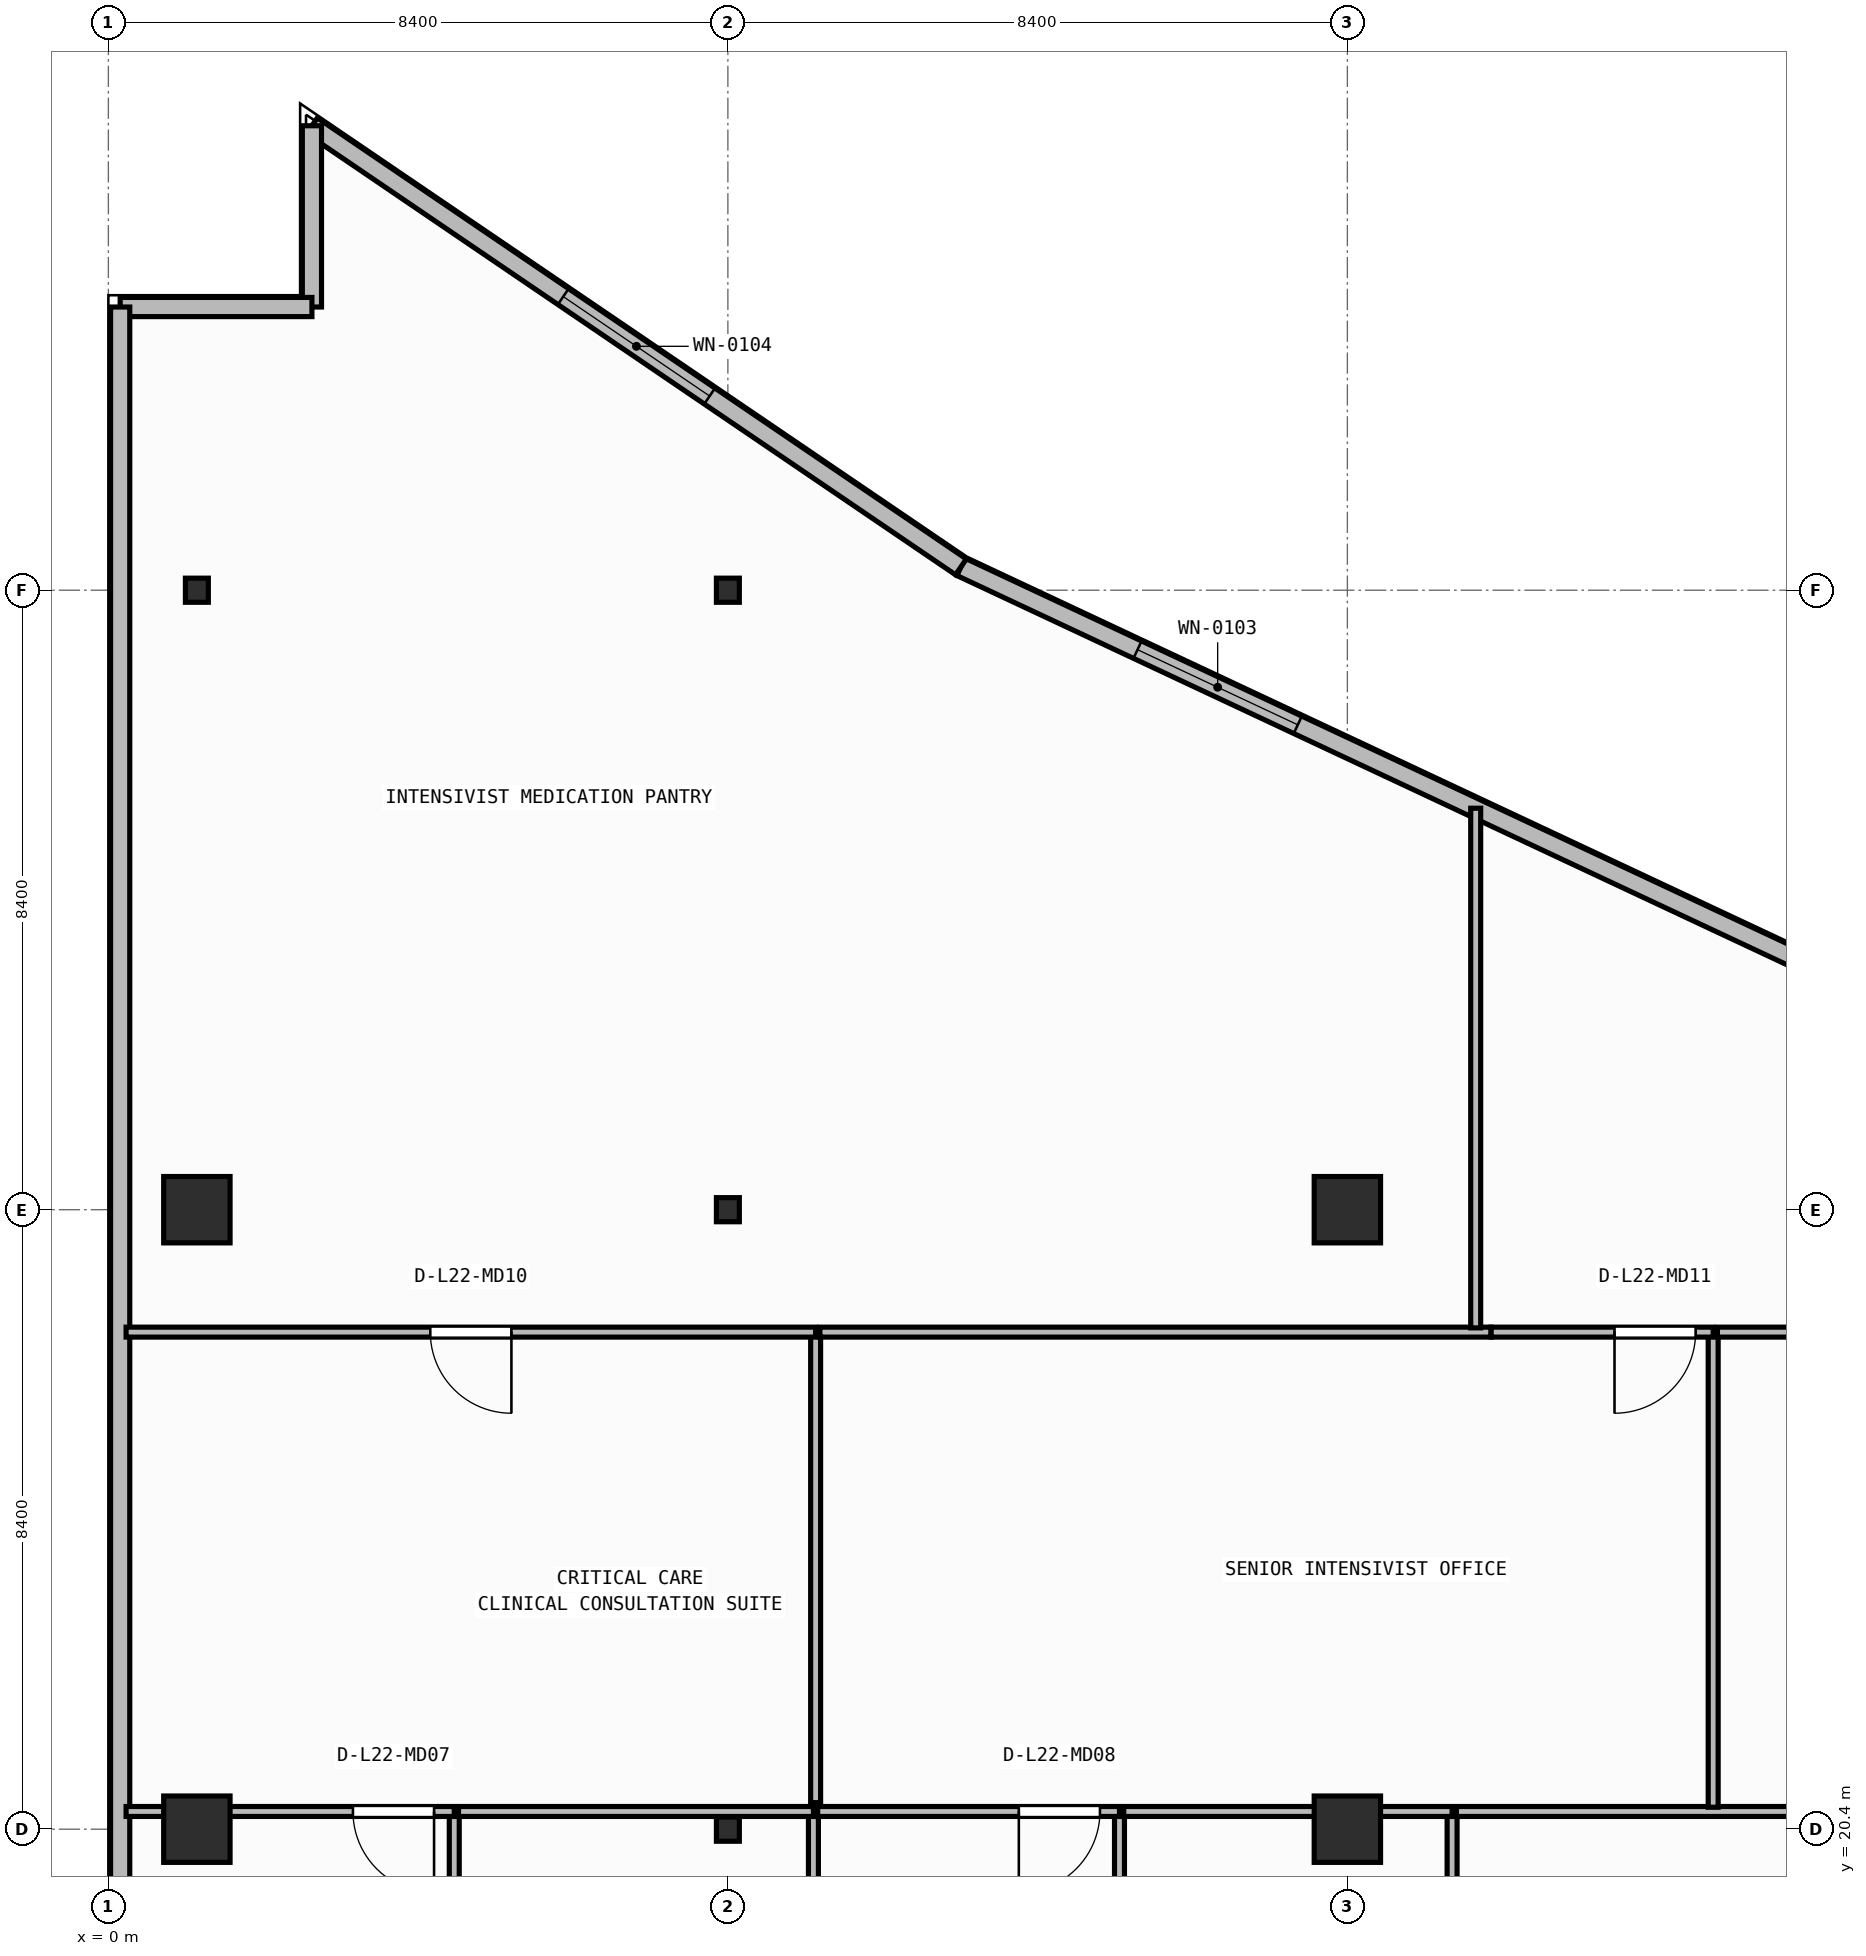
"""IFC4 building model, lengths in metres.
Left out: names, types, materials, properties, quantities, classifications, styles, units other than length and angle.
Written with IfcOpenShell. Run it as: python <this file> out.ifc"""

import sys

from ifc_helpers import new_model, si_unit, direction, frame, frame_2d, origin, origin_2d, place, context, subcontext, project, spatial, rectangle, i_section, extrude, element, fill, save


model = new_model("IFC4")
c1 = context("Model", 3, precision=1e-05, world=origin(), true_north=direction((0.0, 1.0)))
c2 = subcontext(c1, "Body", "Model", "MODEL_VIEW")
j1 = project(units=[si_unit("LENGTHUNIT", "METRE"), si_unit("PLANEANGLEUNIT", "RADIAN")], contexts=[c1])
p1 = place(None, origin())
s1 = spatial("IfcSite", under=j1, at=p1, CompositionType="ELEMENT")
p2 = place(p1, origin())
s2 = spatial("IfcBuilding", under=s1, at=p2, CompositionType="ELEMENT")
p3 = place(p2, frame((0.0, 0.0, 89.65)))
s3 = spatial("IfcBuildingStorey", under=s2, at=p3, CompositionType="ELEMENT", Elevation=89.65)
p4 = place(p3, frame((1.2, 20.4, 0.0), z_axis=(0.0, 0.0, 1.0), x_axis=(1.0, 0.0, 0.0)))
e1 = element("IfcColumn", 1, at=p4, inside=s3, PredefinedType="COLUMN", context=c2, shape_type="SweptSolid", body=[
    extrude(rectangle(XDim=0.9, YDim=0.9, at=origin_2d()), origin(), (0.0, 0.0, 1.0), 3.95),
])
p5 = place(p3, frame((8.4, 20.4, 0.0), z_axis=(0.0, 0.0, 1.0), x_axis=(1.0, 0.0, 0.0)))
e2 = element("IfcColumn", 2, at=p5, inside=s3, PredefinedType="COLUMN", context=c2, shape_type="SweptSolid", body=[
    extrude(i_section(OverallWidth=0.311, OverallDepth=0.327, WebThickness=0.016, FlangeThickness=0.025, FilletRadius=0.017, at=origin_2d()), origin(), (0.0, 0.0, 1.0), 3.95),
])
for number, where, z_axis, x_axis in (
    (3, (16.8, 20.4, 0.0), (0.0, 0.0, 1.0), (1.0, 0.0, 0.0)),
    (4, (1.2, 28.8, 0.0), (0.0, 0.0, 1.0), (1.0, 0.0, 0.0)),
):
    element("IfcColumn", number, at=place(p3, frame(where, z_axis=z_axis, x_axis=x_axis)), inside=s3, PredefinedType="COLUMN", context=c2, shape_type="SweptSolid", body=[
        extrude(rectangle(XDim=0.9, YDim=0.9, at=origin_2d()), origin(), (0.0, 0.0, 1.0), 3.95),
    ])
p6 = place(p3, frame((8.4, 28.8, 0.0), z_axis=(0.0, 0.0, 1.0), x_axis=(1.0, 0.0, 0.0)))
e5 = element("IfcColumn", 5, at=p6, inside=s3, PredefinedType="COLUMN", context=c2, shape_type="SweptSolid", body=[
    extrude(i_section(OverallWidth=0.311, OverallDepth=0.327, WebThickness=0.016, FlangeThickness=0.025, FilletRadius=0.017, at=origin_2d()), origin(), (0.0, 0.0, 1.0), 3.95),
])
p7 = place(p3, frame((16.8, 28.8, 0.0), z_axis=(0.0, 0.0, 1.0), x_axis=(1.0, 0.0, 0.0)))
e6 = element("IfcColumn", 6, at=p7, inside=s3, PredefinedType="COLUMN", context=c2, shape_type="SweptSolid", body=[
    extrude(rectangle(XDim=0.9, YDim=0.9, at=origin_2d()), origin(), (0.0, 0.0, 1.0), 3.95),
])
for number, where, z_axis, x_axis in (
    (7, (1.2, 37.2, 0.0), (0.0, 0.0, 1.0), (1.0, 0.0, 0.0)),
    (8, (8.4, 37.2, 0.0), (0.0, 0.0, 1.0), (1.0, 0.0, 0.0)),
):
    element("IfcColumn", number, at=place(p3, frame(where, z_axis=z_axis, x_axis=x_axis)), inside=s3, PredefinedType="COLUMN", context=c2, shape_type="SweptSolid", body=[
        extrude(i_section(OverallWidth=0.311, OverallDepth=0.327, WebThickness=0.016, FlangeThickness=0.025, FilletRadius=0.017, at=origin_2d()), origin(), (0.0, 0.0, 1.0), 3.95),
    ])
p8 = place(p3, frame((24.408, 31.492, 0.0), z_axis=(0.0, 0.0, 1.0), x_axis=(-0.905396522918, 0.424566998585, 0.0)))
e9 = element("IfcWall", 9, at=p8, inside=s3, PredefinedType="STANDARD", context=c2, shape_type="SweptSolid", body=[
    extrude(rectangle(XDim=14.189, YDim=0.26, at=frame_2d((7.095, 0.0))), origin(), (0.0, 0.0, 1.0), 3.71),
])
p9 = place(p8, frame((9.145, 0.0, 0.9)))
e10 = element("IfcOpeningElement", 10, at=p9, cuts=e9, PredefinedType="OPENING", context=c2, shape_type="SweptSolid", body=[
    extrude(rectangle(XDim=2.4, YDim=1.65, at=frame_2d((1.2, 0.825))), frame((0.0, 0.14, 0.0), z_axis=(0.0, -1.0, 0.0), x_axis=(1.0, 0.0, 0.0)), (0.0, 0.0, 1.0), 0.28),
])
p10 = place(p3, frame((11.561, 37.517, 0.0), z_axis=(0.0, 0.0, 1.0), x_axis=(-0.827064743936, 0.562106670782, 0.0)))
e11 = element("IfcWall", 11, at=p10, inside=s3, PredefinedType="STANDARD", context=c2, shape_type="SweptSolid", body=[
    extrude(rectangle(XDim=10.641, YDim=0.26, at=frame_2d((5.32, 0.0))), origin(), (0.0, 0.0, 1.0), 3.71),
])
p11 = place(p10, frame((4.12, 0.0, 0.9)))
e12 = element("IfcOpeningElement", 12, at=p11, cuts=e11, PredefinedType="OPENING", context=c2, shape_type="SweptSolid", body=[
    extrude(rectangle(XDim=2.4, YDim=1.65, at=frame_2d((1.2, 0.825))), frame((0.0, 0.14, 0.0), z_axis=(0.0, -1.0, 0.0), x_axis=(1.0, 0.0, 0.0)), (0.0, 0.0, 1.0), 0.28),
])
p12 = place(p3, frame((2.76, 43.498, 0.0), z_axis=(0.0, 0.0, 1.0), x_axis=(0.0, -1.0, 0.0)))
e13 = element("IfcWall", 13, at=p12, inside=s3, PredefinedType="STANDARD", context=c2, shape_type="SweptSolid", body=[
    extrude(rectangle(XDim=2.458, YDim=0.26, at=frame_2d((1.229, 0.0))), origin(), (0.0, 0.0, 1.0), 3.71),
])
p13 = place(p3, frame((2.76, 41.04, 0.0), z_axis=(0.0, 0.0, 1.0), x_axis=(-1.0, 0.0, 0.0)))
e14 = element("IfcWall", 14, at=p13, inside=s3, PredefinedType="STANDARD", context=c2, shape_type="SweptSolid", body=[
    extrude(rectangle(XDim=2.6, YDim=0.26, at=frame_2d((1.3, 0.0))), origin(), (0.0, 0.0, 1.0), 3.71),
])
p14 = place(p3, frame((0.16, 41.04, 0.0), z_axis=(0.0, 0.0, 1.0), x_axis=(0.0, -1.0, 0.0)))
e15 = element("IfcWall", 15, at=p14, inside=s3, PredefinedType="STANDARD", context=c2, shape_type="SweptSolid", body=[
    extrude(rectangle(XDim=38.28, YDim=0.26, at=frame_2d((19.14, 0.0))), origin(), (0.0, 0.0, 1.0), 3.71),
])
p15 = place(p14, frame((28.15, 0.0, 0.9)))
e16 = element("IfcOpeningElement", 16, at=p15, cuts=e15, PredefinedType="OPENING", context=c2, shape_type="SweptSolid", body=[
    extrude(rectangle(XDim=2.4, YDim=1.65, at=frame_2d((1.2, 0.825))), frame((0.0, 0.14, 0.0), z_axis=(0.0, -1.0, 0.0), x_axis=(1.0, 0.0, 0.0)), (0.0, 0.0, 1.0), 0.28),
])
p16 = place(p3, frame((4.69, 18.04, 0.0), z_axis=(0.0, 0.0, 1.0), x_axis=(0.0, 1.0, 0.0)))
e17 = element("IfcWall", 17, at=p16, inside=s3, PredefinedType="PARTITIONING", context=c2, shape_type="SweptSolid", body=[
    extrude(rectangle(XDim=2.6, YDim=0.135, at=frame_2d((1.3, 0.0))), origin(), (0.0, 0.0, 1.0), 3.71),
])
p17 = place(p3, frame((4.69, 20.64, 0.0), z_axis=(0.0, 0.0, 1.0), x_axis=(-1.0, 0.0, 0.0)))
e18 = element("IfcWall", 18, at=p17, inside=s3, PredefinedType="PARTITIONING", context=c2, shape_type="SweptSolid", body=[
    extrude(rectangle(XDim=4.45, YDim=0.135, at=frame_2d((2.225, 0.0))), origin(), (0.0, 0.0, 1.0), 3.073),
])
p18 = place(p17, frame((0.274, 0.0, 0.0)))
e19 = element("IfcOpeningElement", 19, at=p18, cuts=e18, PredefinedType="OPENING", context=c2, shape_type="SweptSolid", body=[
    extrude(rectangle(XDim=1.1, YDim=2.1, at=frame_2d((0.55, 1.05))), frame((0.0, 0.077, 0.0), z_axis=(0.0, -1.0, 0.0), x_axis=(1.0, 0.0, 0.0)), (0.0, 0.0, 1.0), 0.155),
])
p19 = place(p3, frame((9.56, 17.833, 0.0), z_axis=(0.0, 0.0, 1.0), x_axis=(0.0, 1.0, 0.0)))
e20 = element("IfcWall", 20, at=p19, inside=s3, PredefinedType="PARTITIONING", context=c2, shape_type="SweptSolid", body=[
    extrude(rectangle(XDim=2.807, YDim=0.135, at=frame_2d((1.404, 0.0))), origin(), (0.0, 0.0, 1.0), 3.71),
])
p20 = place(p3, frame((9.56, 20.64, 0.0), z_axis=(0.0, 0.0, 1.0), x_axis=(-1.0, 0.0, 0.0)))
e21 = element("IfcWall", 21, at=p20, inside=s3, PredefinedType="PARTITIONING", context=c2, shape_type="SweptSolid", body=[
    extrude(rectangle(XDim=4.812, YDim=0.135, at=frame_2d((2.406, 0.0))), origin(), (0.0, 0.0, 1.0), 3.073),
])
p21 = place(p3, frame((13.71, 14.76, 0.0), z_axis=(0.0, 0.0, 1.0), x_axis=(0.0, 1.0, 0.0)))
e22 = element("IfcWall", 22, at=p21, inside=s3, PredefinedType="PARTITIONING", context=c2, shape_type="SweptSolid", body=[
    extrude(rectangle(XDim=5.88, YDim=0.135, at=frame_2d((2.94, 0.0))), origin(), (0.0, 0.0, 1.0), 3.71),
])
p22 = place(p3, frame((13.71, 20.64, 0.0), z_axis=(0.0, 0.0, 1.0), x_axis=(-1.0, 0.0, 0.0)))
e23 = element("IfcWall", 23, at=p22, inside=s3, PredefinedType="PARTITIONING", context=c2, shape_type="SweptSolid", body=[
    extrude(rectangle(XDim=4.093, YDim=0.135, at=frame_2d((2.046, 0.0))), origin(), (0.0, 0.0, 1.0), 3.073),
])
p23 = place(p22, frame((0.265, 0.0, 0.0)))
e24 = element("IfcOpeningElement", 24, at=p23, cuts=e23, PredefinedType="OPENING", context=c2, shape_type="SweptSolid", body=[
    extrude(rectangle(XDim=1.1, YDim=2.1, at=frame_2d((0.55, 1.05))), frame((0.0, 0.077, 0.0), z_axis=(0.0, -1.0, 0.0), x_axis=(1.0, 0.0, 0.0)), (0.0, 0.0, 1.0), 0.155),
])
p24 = place(p3, frame((18.22, 17.833, 0.0), z_axis=(0.0, 0.0, 1.0), x_axis=(0.0, 1.0, 0.0)))
e25 = element("IfcWall", 25, at=p24, inside=s3, PredefinedType="PARTITIONING", context=c2, shape_type="SweptSolid", body=[
    extrude(rectangle(XDim=2.807, YDim=0.135, at=frame_2d((1.404, 0.0))), origin(), (0.0, 0.0, 1.0), 3.71),
])
p25 = place(p3, frame((18.22, 20.64, 0.0), z_axis=(0.0, 0.0, 1.0), x_axis=(-1.0, 0.0, 0.0)))
e26 = element("IfcWall", 26, at=p25, inside=s3, PredefinedType="PARTITIONING", context=c2, shape_type="SweptSolid", body=[
    extrude(rectangle(XDim=4.452, YDim=0.135, at=frame_2d((2.226, 0.0))), origin(), (0.0, 0.0, 1.0), 3.073),
])
p26 = place(p3, frame((23.032, 20.64, 0.0), z_axis=(0.0, 0.0, 1.0), x_axis=(-1.0, 0.0, 0.0)))
e27 = element("IfcWall", 27, at=p26, inside=s3, PredefinedType="PARTITIONING", context=c2, shape_type="SweptSolid", body=[
    extrude(rectangle(XDim=4.755, YDim=0.135, at=frame_2d((2.377, 0.0))), origin(), (0.0, 0.0, 1.0), 3.073),
])
p27 = place(p3, frame((9.59, 20.76, 0.0), z_axis=(0.0, 0.0, 1.0), x_axis=(0.0, 1.0, 0.0)))
e28 = element("IfcWall", 28, at=p27, inside=s3, PredefinedType="PARTITIONING", context=c2, shape_type="SweptSolid", body=[
    extrude(rectangle(XDim=6.38, YDim=0.135, at=frame_2d((3.19, 0.0))), origin(), (0.0, 0.0, 1.0), 3.71),
])
p28 = place(p3, frame((9.59, 27.14, 0.0), z_axis=(0.0, 0.0, 1.0), x_axis=(-1.0, 0.0, 0.0)))
e29 = element("IfcWall", 29, at=p28, inside=s3, PredefinedType="PARTITIONING", context=c2, shape_type="SweptSolid", body=[
    extrude(rectangle(XDim=9.35, YDim=0.135, at=frame_2d((4.675, 0.0))), origin(), (0.0, 0.0, 1.0), 3.71),
])
p29 = place(p28, frame((4.125, 0.0, 0.0)))
e30 = element("IfcOpeningElement", 30, at=p29, cuts=e29, PredefinedType="OPENING", context=c2, shape_type="SweptSolid", body=[
    extrude(rectangle(XDim=1.1, YDim=2.1, at=frame_2d((0.55, 1.05))), frame((0.0, 0.077, 0.0), z_axis=(0.0, -1.0, 0.0), x_axis=(1.0, 0.0, 0.0)), (0.0, 0.0, 1.0), 0.155),
])
p30 = place(p3, frame((21.76, 20.698, 0.0), z_axis=(0.0, 0.0, 1.0), x_axis=(0.0, 1.0, 0.0)))
e31 = element("IfcWall", 31, at=p30, inside=s3, PredefinedType="PARTITIONING", context=c2, shape_type="SweptSolid", body=[
    extrude(rectangle(XDim=6.442, YDim=0.135, at=frame_2d((3.221, 0.0))), origin(), (0.0, 0.0, 1.0), 3.71),
])
p31 = place(p3, frame((18.748, 27.14, 0.0), z_axis=(0.0, 0.0, 1.0), x_axis=(-1.0, 0.0, 0.0)))
e32 = element("IfcWall", 32, at=p31, inside=s3, PredefinedType="PARTITIONING", context=c2, shape_type="SweptSolid", body=[
    extrude(rectangle(XDim=9.1, YDim=0.135, at=frame_2d((4.55, 0.0))), origin(), (0.0, 0.0, 1.0), 3.71),
])
p32 = place(p3, frame((21.76, 27.14, 0.0), z_axis=(0.0, 0.0, 1.0), x_axis=(-1.0, 0.0, 0.0)))
e33 = element("IfcWall", 33, at=p32, inside=s3, PredefinedType="PARTITIONING", context=c2, shape_type="SweptSolid", body=[
    extrude(rectangle(XDim=3.01, YDim=0.135, at=frame_2d((1.505, 0.0))), origin(), (0.0, 0.0, 1.0), 3.71),
])
p33 = place(p32, frame((0.238, 0.0, 0.0)))
e34 = element("IfcOpeningElement", 34, at=p33, cuts=e33, PredefinedType="OPENING", context=c2, shape_type="SweptSolid", body=[
    extrude(rectangle(XDim=1.1, YDim=2.1, at=frame_2d((0.55, 1.05))), frame((0.0, 0.077, 0.0), z_axis=(0.0, -1.0, 0.0), x_axis=(1.0, 0.0, 0.0)), (0.0, 0.0, 1.0), 0.155),
])
p34 = place(p3, frame((38.45, 27.14, 0.0), z_axis=(0.0, 0.0, 1.0), x_axis=(-1.0, 0.0, 0.0)))
e35 = element("IfcWall", 35, at=p34, inside=s3, PredefinedType="PARTITIONING", context=c2, shape_type="SweptSolid", body=[
    extrude(rectangle(XDim=16.633, YDim=0.135, at=frame_2d((8.316, 0.0))), origin(), (0.0, 0.0, 1.0), 3.71),
])
p35 = place(p3, frame((18.54, 27.198, 0.0), z_axis=(0.0, 0.0, 1.0), x_axis=(0.0, 1.0, 0.0)))
e36 = element("IfcWall", 36, at=p35, inside=s3, PredefinedType="PARTITIONING", context=c2, shape_type="SweptSolid", body=[
    extrude(rectangle(XDim=7.046, YDim=0.135, at=frame_2d((3.523, 0.0))), origin(), (0.0, 0.0, 1.0), 3.71),
])
p36 = place(p9, origin())
e37 = element("IfcWindow", 37, at=p36, inside=s3, PartitioningType="SINGLE_PANEL", PredefinedType="WINDOW", context=c2, shape_type="SweptSolid", body=[
    extrude(rectangle(XDim=2.4, YDim=1.65, at=frame_2d((1.2, 0.825))), frame((0.0, 0.03, 0.0), z_axis=(0.0, -1.0, 0.0), x_axis=(1.0, 0.0, 0.0)), (0.0, 0.0, 1.0), 0.06),
])
fill(e10, e37)
p37 = place(p11, origin())
e38 = element("IfcWindow", 38, at=p37, inside=s3, PartitioningType="SINGLE_PANEL", PredefinedType="WINDOW", context=c2, shape_type="SweptSolid", body=[
    extrude(rectangle(XDim=2.4, YDim=1.65, at=frame_2d((1.2, 0.825))), frame((0.0, 0.03, 0.0), z_axis=(0.0, -1.0, 0.0), x_axis=(1.0, 0.0, 0.0)), (0.0, 0.0, 1.0), 0.06),
])
fill(e12, e38)
p38 = place(p18, origin())
e39 = element("IfcDoor", 39, at=p38, inside=s3, OperationType="SINGLE_SWING_LEFT", PredefinedType="DOOR", context=c2, shape_type="SweptSolid", body=[
    extrude(rectangle(XDim=1.1, YDim=2.1, at=frame_2d((0.55, 1.05))), frame((0.0, 0.025, 0.0), z_axis=(0.0, -1.0, 0.0), x_axis=(1.0, 0.0, 0.0)), (0.0, 0.0, 1.0), 0.05),
])
fill(e19, e39)
p39 = place(p23, origin())
e40 = element("IfcDoor", 40, at=p39, inside=s3, OperationType="SINGLE_SWING_RIGHT", PredefinedType="DOOR", context=c2, shape_type="SweptSolid", body=[
    extrude(rectangle(XDim=1.1, YDim=2.1, at=frame_2d((0.55, 1.05))), frame((0.0, 0.025, 0.0), z_axis=(0.0, -1.0, 0.0), x_axis=(1.0, 0.0, 0.0)), (0.0, 0.0, 1.0), 0.05),
])
fill(e24, e40)
p40 = place(p29, origin())
e41 = element("IfcDoor", 41, at=p40, inside=s3, OperationType="SINGLE_SWING_LEFT", PredefinedType="DOOR", context=c2, shape_type="SweptSolid", body=[
    extrude(rectangle(XDim=1.1, YDim=2.1, at=frame_2d((0.55, 1.05))), frame((0.0, 0.025, 0.0), z_axis=(0.0, -1.0, 0.0), x_axis=(1.0, 0.0, 0.0)), (0.0, 0.0, 1.0), 0.05),
])
fill(e30, e41)
p41 = place(p33, origin())
e42 = element("IfcDoor", 42, at=p41, inside=s3, OperationType="SINGLE_SWING_RIGHT", PredefinedType="DOOR", context=c2, shape_type="SweptSolid", body=[
    extrude(rectangle(XDim=1.1, YDim=2.1, at=frame_2d((0.55, 1.05))), frame((0.0, 0.025, 0.0), z_axis=(0.0, -1.0, 0.0), x_axis=(1.0, 0.0, 0.0)), (0.0, 0.0, 1.0), 0.05),
])
fill(e34, e42)
save(model, sys.argv[1])
